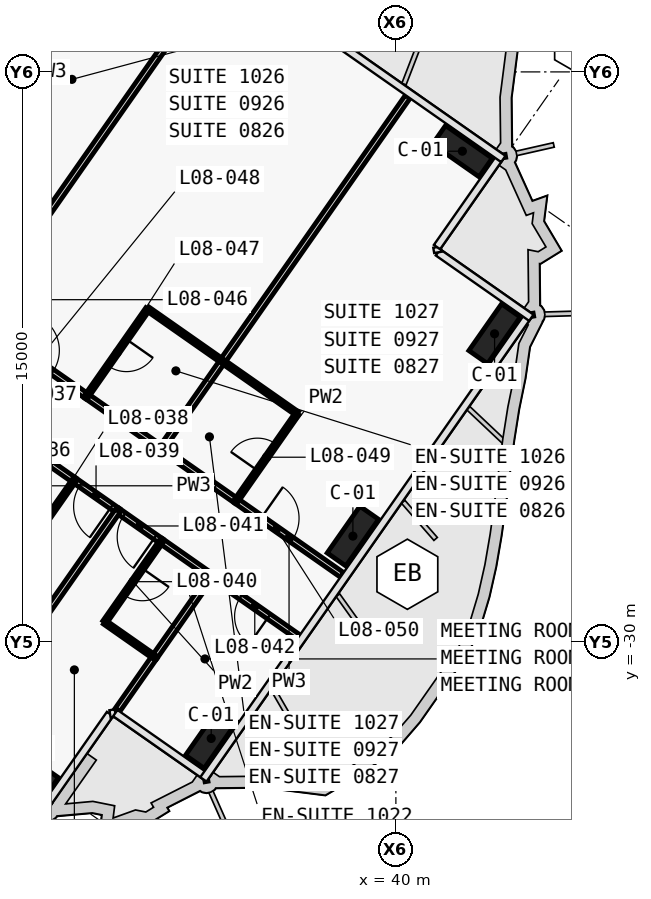
"""IFC4 building model, lengths in metres.
Left out: names, types, materials, properties, quantities, classifications, styles, units other than length and angle.
Written with IfcOpenShell. Run it as: python <this file> out.ifc"""

import sys

from ifc_helpers import new_model, si_unit, direction, frame, frame_2d, origin, origin_2d, place, context, subcontext, project, spatial, rectangle, extrude, element, fill, save


model = new_model("IFC4")
c1 = context("Model", 3, precision=1e-05, world=origin(), true_north=direction((0.0, 1.0)))
c2 = subcontext(c1, "Body", "Model", "MODEL_VIEW")
j1 = project(units=[si_unit("LENGTHUNIT", "METRE"), si_unit("PLANEANGLEUNIT", "RADIAN")], contexts=[c1])
p1 = place(None, origin())
s1 = spatial("IfcSite", under=j1, at=p1, CompositionType="ELEMENT")
p2 = place(p1, origin())
s2 = spatial("IfcBuilding", under=s1, at=p2, CompositionType="ELEMENT")
p3 = place(p2, frame((0.0, 0.0, 54.5)))
s3 = spatial("IfcBuildingStorey", under=s2, at=p3, CompositionType="ELEMENT", Elevation=54.5)
for number, where, z_axis, x_axis in (
    (1, (30.336, -33.388, 0.0), (0.0, 0.0, 1.0), (0.819, -0.574, 0.0)),
    (2, (41.75, -17.087, 0.0), (0.0, 0.0, 1.0), (0.819, -0.574, 0.0)),
    (3, (35.14, -32.541, 0.0), (0.0, 0.0, 1.0), (0.574, 0.819, 0.0)),
    (4, (38.869, -27.216, 0.0), (0.0, 0.0, 1.0), (0.574, 0.819, 0.0)),
    (5, (42.597, -21.892, 0.0), (0.0, 0.0, 1.0), (0.574, 0.819, 0.0)),
):
    element("IfcColumn", number, at=place(p3, frame(where, z_axis=z_axis, x_axis=x_axis)), inside=s3, PredefinedType="COLUMN", context=c2, shape_type="SweptSolid", body=[
        extrude(rectangle(XDim=1.5, YDim=0.6, at=origin_2d()), origin(), (0.0, 0.0, 1.0), 3.6),
    ])
p4 = place(p3, frame((28.914, -21.467, 0.0), z_axis=(0.0, 0.0, 1.0), x_axis=(0.819145961204, -0.573585123798, 0.0)))
e6 = element("IfcWall", 6, at=p4, inside=s3, PredefinedType="PARTITIONING", context=c2, shape_type="SweptSolid", body=[
    extrude(rectangle(XDim=3.603, YDim=0.15, at=frame_2d((1.802, 0.0))), origin(), (0.0, 0.0, 1.0), 2.6),
])
p5 = place(p4, frame((1.502, 0.0, 0.0)))
e7 = element("IfcOpeningElement", 7, at=p5, cuts=e6, PredefinedType="OPENING", context=c2, shape_type="SweptSolid", body=[
    extrude(rectangle(XDim=1.0, YDim=2.1, at=frame_2d((0.5, 1.05))), frame((0.0, 0.085, 0.0), z_axis=(0.0, -1.0, 0.0), x_axis=(1.0, 0.0, 0.0)), (0.0, 0.0, 1.0), 0.17),
])
p6 = place(p3, frame((31.863, -23.531, 0.0), z_axis=(0.0, 0.0, 1.0), x_axis=(0.819146032251, -0.573585022335, 0.0)))
e8 = element("IfcWall", 8, at=p6, inside=s3, PredefinedType="PARTITIONING", context=c2, shape_type="SweptSolid", body=[
    extrude(rectangle(XDim=2.404, YDim=0.15, at=frame_2d((1.202, 0.0))), origin(), (0.0, 0.0, 1.0), 3.32),
])
p7 = place(p3, frame((35.796, -26.285, 0.0), z_axis=(0.0, 0.0, 1.0), x_axis=(0.819154345195, -0.573573150303, 0.0)))
e9 = element("IfcWall", 9, at=p7, inside=s3, PredefinedType="PARTITIONING", context=c2, shape_type="SweptSolid", body=[
    extrude(rectangle(XDim=3.401, YDim=0.15, at=frame_2d((1.7, 0.0))), origin(), (0.0, 0.0, 1.0), 2.5),
])
p8 = place(p7, frame((0.801, 0.0, 0.0)))
e10 = element("IfcOpeningElement", 10, at=p8, cuts=e9, PredefinedType="OPENING", context=c2, shape_type="SweptSolid", body=[
    extrude(rectangle(XDim=1.0, YDim=2.1, at=frame_2d((0.5, 1.05))), frame((0.0, 0.085, 0.0), z_axis=(0.0, -1.0, 0.0), x_axis=(1.0, 0.0, 0.0)), (0.0, 0.0, 1.0), 0.17),
])
p9 = place(p3, frame((33.829, -24.908, 0.0), z_axis=(0.0, 0.0, 1.0), x_axis=(0.819146032251, -0.573585022335, 0.0)))
e11 = element("IfcWall", 11, at=p9, inside=s3, PredefinedType="PARTITIONING", context=c2, shape_type="SweptSolid", body=[
    extrude(rectangle(XDim=2.404, YDim=0.15, at=frame_2d((1.202, 0.0))), origin(), (0.0, 0.0, 1.0), 3.32),
])
p10 = place(p3, frame((37.435, -29.875, 0.0), z_axis=(0.0, 0.0, 1.0), x_axis=(-0.819125488359, 0.573614360281, 0.0)))
e12 = element("IfcWall", 12, at=p10, inside=s3, PredefinedType="PARTITIONING", context=c2, shape_type="SweptSolid", body=[
    extrude(rectangle(XDim=2.802, YDim=0.15, at=frame_2d((1.401, 0.0))), origin(), (0.0, 0.0, 1.0), 2.5),
])
p11 = place(p10, frame((0.951, 0.0, 0.0)))
e13 = element("IfcOpeningElement", 13, at=p11, cuts=e12, PredefinedType="OPENING", context=c2, shape_type="SweptSolid", body=[
    extrude(rectangle(XDim=0.9, YDim=2.1, at=frame_2d((0.45, 1.05))), frame((0.0, 0.085, 0.0), z_axis=(0.0, -1.0, 0.0), x_axis=(1.0, 0.0, 0.0)), (0.0, 0.0, 1.0), 0.17),
])
p12 = place(p3, frame((32.685, -26.549, 0.0), z_axis=(0.0, 0.0, 1.0), x_axis=(-0.819199220913, 0.573509055252, 0.0)))
e14 = element("IfcWall", 14, at=p12, inside=s3, PredefinedType="PARTITIONING", context=c2, shape_type="SweptSolid", body=[
    extrude(rectangle(XDim=1.403, YDim=0.15, at=frame_2d((0.702, 0.0))), origin(), (0.0, 0.0, 1.0), 3.32),
])
p13 = place(p12, frame((0.202, 0.0, 0.0)))
e15 = element("IfcOpeningElement", 15, at=p13, cuts=e14, PredefinedType="OPENING", context=c2, shape_type="SweptSolid", body=[
    extrude(rectangle(XDim=1.0, YDim=2.1, at=frame_2d((0.5, 1.05))), frame((0.0, 0.085, 0.0), z_axis=(0.0, -1.0, 0.0), x_axis=(1.0, 0.0, 0.0)), (0.0, 0.0, 1.0), 0.17),
])
p14 = place(p3, frame((31.539, -25.746, 0.0), z_axis=(0.0, 0.0, 1.0), x_axis=(-0.819117502046, 0.573625764625, 0.0)))
e16 = element("IfcWall", 16, at=p14, inside=s3, PredefinedType="PARTITIONING", context=c2, shape_type="SweptSolid", body=[
    extrude(rectangle(XDim=1.604, YDim=0.15, at=frame_2d((0.802, 0.0))), origin(), (0.0, 0.0, 1.0), 3.32),
])
p15 = place(p3, frame((33.831, -27.351, 0.0), z_axis=(0.0, 0.0, 1.0), x_axis=(-0.819117471667, 0.573625808005, 0.0)))
e17 = element("IfcWall", 17, at=p15, inside=s3, PredefinedType="PARTITIONING", context=c2, shape_type="SweptSolid", body=[
    extrude(rectangle(XDim=1.403, YDim=0.15, at=frame_2d((0.702, 0.0))), origin(), (0.0, 0.0, 1.0), 3.32),
])
p16 = place(p15, frame((0.201, 0.0, 0.0)))
e18 = element("IfcOpeningElement", 18, at=p16, cuts=e17, PredefinedType="OPENING", context=c2, shape_type="SweptSolid", body=[
    extrude(rectangle(XDim=1.0, YDim=2.1, at=frame_2d((0.5, 1.05))), frame((0.0, 0.085, 0.0), z_axis=(0.0, -1.0, 0.0), x_axis=(1.0, 0.0, 0.0)), (0.0, 0.0, 1.0), 0.17),
])
p17 = place(p3, frame((35.143, -28.27, 0.0), z_axis=(0.0, 0.0, 1.0), x_axis=(-0.819189013667, 0.573523634986, 0.0)))
e19 = element("IfcWall", 19, at=p17, inside=s3, PredefinedType="PARTITIONING", context=c2, shape_type="SweptSolid", body=[
    extrude(rectangle(XDim=1.604, YDim=0.15, at=frame_2d((0.802, 0.0))), origin(), (0.0, 0.0, 1.0), 3.32),
])
p18 = place(p3, frame((32.94, -10.491, 0.0), z_axis=(0.0, 0.0, 1.0), x_axis=(-0.573593433868, -0.819140142237, 0.0)))
e20 = element("IfcWall", 20, at=p18, inside=s3, PredefinedType="PARTITIONING", context=c2, shape_type="SweptSolid", body=[
    extrude(rectangle(XDim=8.499, YDim=0.15, at=frame_2d((4.25, 0.0))), origin(), (0.0, 0.0, 1.0), 2.6),
])
p19 = place(p3, frame((35.013, -12.76, 0.0), z_axis=(0.0, 0.0, 1.0), x_axis=(-0.573558725113, -0.819164445546, 0.0)))
e21 = element("IfcWall", 21, at=p19, inside=s3, PredefinedType="PARTITIONING", context=c2, shape_type="SweptSolid", body=[
    extrude(rectangle(XDim=9.01, YDim=0.15, at=frame_2d((4.505, 0.0))), origin(), (0.0, 0.0, 1.0), 2.6),
])
p20 = place(p3, frame((35.438, -22.615, 0.0), z_axis=(0.0, 0.0, 1.0), x_axis=(-0.819141114317, 0.573592045652, 0.0)))
e22 = element("IfcWall", 22, at=p20, inside=s3, PredefinedType="PARTITIONING", context=c2, shape_type="SweptSolid", body=[
    extrude(rectangle(XDim=2.4, YDim=0.12, at=frame_2d((1.2, 0.0))), origin(), (0.0, 0.0, 1.0), 3.32),
])
p21 = place(p3, frame((33.47, -21.239, 0.0), z_axis=(0.0, 0.0, 1.0), x_axis=(-0.573550118428, -0.819170471667, 0.0)))
e23 = element("IfcWall", 23, at=p21, inside=s3, PredefinedType="PARTITIONING", context=c2, shape_type="SweptSolid", body=[
    extrude(rectangle(XDim=2.8, YDim=0.12, at=frame_2d((1.4, 0.0))), origin(), (0.0, 0.0, 1.0), 2.6),
])
p22 = place(p21, frame((0.975, 0.0, 0.0)))
e24 = element("IfcOpeningElement", 24, at=p22, cuts=e23, PredefinedType="OPENING", context=c2, shape_type="SweptSolid", body=[
    extrude(rectangle(XDim=0.85, YDim=2.05, at=frame_2d((0.425, 1.025))), frame((0.0, 0.07, 0.0), z_axis=(0.0, -1.0, 0.0), x_axis=(1.0, 0.0, 0.0)), (0.0, 0.0, 1.0), 0.14),
])
p23 = place(p3, frame((40.312, -15.653, 0.0), z_axis=(0.0, 0.0, 1.0), x_axis=(-0.573560662175, -0.81916308926, 0.0)))
e25 = element("IfcWall", 25, at=p23, inside=s3, PredefinedType="PARTITIONING", context=c2, shape_type="SweptSolid", body=[
    extrude(rectangle(XDim=8.499, YDim=0.15, at=frame_2d((4.25, 0.0))), origin(), (0.0, 0.0, 1.0), 2.5),
])
p24 = place(p3, frame((35.437, -22.616, 0.0), z_axis=(0.0, 0.0, 1.0), x_axis=(-0.573550118428, -0.819170471667, 0.0)))
e26 = element("IfcWall", 26, at=p24, inside=s3, PredefinedType="PARTITIONING", context=c2, shape_type="SweptSolid", body=[
    extrude(rectangle(XDim=2.8, YDim=0.15, at=frame_2d((1.4, 0.0))), origin(), (0.0, 0.0, 1.0), 2.6),
])
p25 = place(p3, frame((35.798, -26.287, 0.0), z_axis=(0.0, 0.0, 1.0), x_axis=(0.573550118428, 0.819170471667, 0.0)))
e27 = element("IfcWall", 27, at=p25, inside=s3, PredefinedType="PARTITIONING", context=c2, shape_type="SweptSolid", body=[
    extrude(rectangle(XDim=2.8, YDim=0.12, at=frame_2d((1.4, 0.0))), origin(), (0.0, 0.0, 1.0), 2.6),
])
p26 = place(p25, frame((0.975, 0.0, 0.0)))
e28 = element("IfcOpeningElement", 28, at=p26, cuts=e27, PredefinedType="OPENING", context=c2, shape_type="SweptSolid", body=[
    extrude(rectangle(XDim=0.85, YDim=2.05, at=frame_2d((0.425, 1.025))), frame((0.0, 0.07, 0.0), z_axis=(0.0, -1.0, 0.0), x_axis=(1.0, 0.0, 0.0)), (0.0, 0.0, 1.0), 0.14),
])
p27 = place(p3, frame((37.403, -23.991, 0.0), z_axis=(0.0, 0.0, 1.0), x_axis=(-0.819155442668, 0.573571582932, 0.0)))
e29 = element("IfcWall", 29, at=p27, inside=s3, PredefinedType="PARTITIONING", context=c2, shape_type="SweptSolid", body=[
    extrude(rectangle(XDim=2.4, YDim=0.12, at=frame_2d((1.2, 0.0))), origin(), (0.0, 0.0, 1.0), 3.32),
])
p28 = place(p3, frame((33.65, -30.397, 0.0), z_axis=(0.0, 0.0, 1.0), x_axis=(-0.573568305454, -0.819157737544, 0.0)))
e30 = element("IfcWall", 30, at=p28, inside=s3, PredefinedType="PARTITIONING", context=c2, shape_type="SweptSolid", body=[
    extrude(rectangle(XDim=1.701, YDim=0.15, at=frame_2d((0.851, 0.0))), origin(), (0.0, 0.0, 1.0), 3.32),
])
p29 = place(p3, frame((33.649, -30.4, 0.0), z_axis=(0.0, 0.0, 1.0), x_axis=(0.573544201094, 0.819174614714, 0.0)))
e31 = element("IfcWall", 31, at=p29, inside=s3, PredefinedType="PARTITIONING", context=c2, shape_type="SweptSolid", body=[
    extrude(rectangle(XDim=2.602, YDim=0.15, at=frame_2d((1.301, 0.0))), origin(), (0.0, 0.0, 1.0), 3.32),
])
p30 = place(p3, frame((30.046, -27.875, 0.0), z_axis=(0.0, 0.0, 1.0), x_axis=(0.573537965655, 0.819178980414, 0.0)))
e32 = element("IfcWall", 32, at=p30, inside=s3, PredefinedType="PARTITIONING", context=c2, shape_type="SweptSolid", body=[
    extrude(rectangle(XDim=2.6, YDim=0.12, at=frame_2d((1.3, 0.0))), origin(), (0.0, 0.0, 1.0), 3.32),
])
p31 = place(p30, frame((0.875, 0.0, 0.0)))
e33 = element("IfcOpeningElement", 33, at=p31, cuts=e32, PredefinedType="OPENING", context=c2, shape_type="SweptSolid", body=[
    extrude(rectangle(XDim=0.85, YDim=2.05, at=frame_2d((0.425, 1.025))), frame((0.0, 0.07, 0.0), z_axis=(0.0, -1.0, 0.0), x_axis=(1.0, 0.0, 0.0)), (0.0, 0.0, 1.0), 0.14),
])
p32 = place(p3, frame((32.684, -26.548, 0.0), z_axis=(0.0, 0.0, 1.0), x_axis=(-0.573556610931, -0.81916592584, 0.0)))
e34 = element("IfcWall", 34, at=p32, inside=s3, PredefinedType="PARTITIONING", context=c2, shape_type="SweptSolid", body=[
    extrude(rectangle(XDim=7.3, YDim=0.15, at=frame_2d((3.65, 0.0))), origin(), (0.0, 0.0, 1.0), 2.5),
])
p33 = place(p3, frame((33.83, -27.35, 0.0), z_axis=(0.0, 0.0, 1.0), x_axis=(-0.573537965655, -0.819178980414, 0.0)))
e35 = element("IfcWall", 35, at=p33, inside=s3, PredefinedType="PARTITIONING", context=c2, shape_type="SweptSolid", body=[
    extrude(rectangle(XDim=2.6, YDim=0.12, at=frame_2d((1.3, 0.0))), origin(), (0.0, 0.0, 1.0), 3.32),
])
p34 = place(p33, frame((0.875, 0.0, 0.0)))
e36 = element("IfcOpeningElement", 36, at=p34, cuts=e35, PredefinedType="OPENING", context=c2, shape_type="SweptSolid", body=[
    extrude(rectangle(XDim=0.85, YDim=2.05, at=frame_2d((0.425, 1.025))), frame((0.0, 0.07, 0.0), z_axis=(0.0, -1.0, 0.0), x_axis=(1.0, 0.0, 0.0)), (0.0, 0.0, 1.0), 0.14),
])
p35 = place(p3, frame((32.339, -29.481, 0.0), z_axis=(0.0, 0.0, 1.0), x_axis=(0.819131543282, -0.57360571371, 0.0)))
e37 = element("IfcWall", 37, at=p35, inside=s3, PredefinedType="PARTITIONING", context=c2, shape_type="SweptSolid", body=[
    extrude(rectangle(XDim=1.6, YDim=0.12, at=frame_2d((0.8, 0.0))), origin(), (0.0, 0.0, 1.0), 3.32),
])
p36 = place(p31, origin())
e38 = element("IfcDoor", 38, at=p36, inside=s3, OperationType="SINGLE_SWING_LEFT", PredefinedType="DOOR", context=c2, shape_type="SweptSolid", body=[
    extrude(rectangle(XDim=0.85, YDim=2.05, at=frame_2d((0.425, 1.025))), frame((0.0, 0.025, 0.0), z_axis=(0.0, -1.0, 0.0), x_axis=(1.0, 0.0, 0.0)), (0.0, 0.0, 1.0), 0.05),
])
fill(e33, e38)
p37 = place(p13, origin())
e39 = element("IfcDoor", 39, at=p37, inside=s3, OperationType="SINGLE_SWING_RIGHT", PredefinedType="DOOR", context=c2, shape_type="SweptSolid", body=[
    extrude(rectangle(XDim=1.0, YDim=2.1, at=frame_2d((0.5, 1.05))), frame((0.0, 0.025, 0.0), z_axis=(0.0, -1.0, 0.0), x_axis=(1.0, 0.0, 0.0)), (0.0, 0.0, 1.0), 0.05),
])
fill(e15, e39)
p38 = place(p34, origin())
e40 = element("IfcDoor", 40, at=p38, inside=s3, OperationType="SINGLE_SWING_LEFT", PredefinedType="DOOR", context=c2, shape_type="SweptSolid", body=[
    extrude(rectangle(XDim=0.85, YDim=2.05, at=frame_2d((0.425, 1.025))), frame((0.0, 0.025, 0.0), z_axis=(0.0, -1.0, 0.0), x_axis=(1.0, 0.0, 0.0)), (0.0, 0.0, 1.0), 0.05),
])
fill(e36, e40)
p39 = place(p16, origin())
e41 = element("IfcDoor", 41, at=p39, inside=s3, OperationType="SINGLE_SWING_RIGHT", PredefinedType="DOOR", context=c2, shape_type="SweptSolid", body=[
    extrude(rectangle(XDim=1.0, YDim=2.1, at=frame_2d((0.5, 1.05))), frame((0.0, 0.025, 0.0), z_axis=(0.0, -1.0, 0.0), x_axis=(1.0, 0.0, 0.0)), (0.0, 0.0, 1.0), 0.05),
])
fill(e18, e41)
p40 = place(p11, origin())
e42 = element("IfcDoor", 42, at=p40, inside=s3, OperationType="SINGLE_SWING_RIGHT", PredefinedType="DOOR", context=c2, shape_type="SweptSolid", body=[
    extrude(rectangle(XDim=0.9, YDim=2.1, at=frame_2d((0.45, 1.05))), frame((0.0, 0.025, 0.0), z_axis=(0.0, -1.0, 0.0), x_axis=(1.0, 0.0, 0.0)), (0.0, 0.0, 1.0), 0.05),
])
fill(e13, e42)
p41 = place(p22, origin())
e43 = element("IfcDoor", 43, at=p41, inside=s3, OperationType="SINGLE_SWING_LEFT", PredefinedType="DOOR", context=c2, shape_type="SweptSolid", body=[
    extrude(rectangle(XDim=0.85, YDim=2.05, at=frame_2d((0.425, 1.025))), frame((0.0, 0.025, 0.0), z_axis=(0.0, -1.0, 0.0), x_axis=(1.0, 0.0, 0.0)), (0.0, 0.0, 1.0), 0.05),
])
fill(e24, e43)
p42 = place(p5, origin())
e44 = element("IfcDoor", 44, at=p42, inside=s3, OperationType="SINGLE_SWING_RIGHT", PredefinedType="DOOR", context=c2, shape_type="SweptSolid", body=[
    extrude(rectangle(XDim=1.0, YDim=2.1, at=frame_2d((0.5, 1.05))), frame((0.0, 0.025, 0.0), z_axis=(0.0, -1.0, 0.0), x_axis=(1.0, 0.0, 0.0)), (0.0, 0.0, 1.0), 0.05),
])
fill(e7, e44)
p43 = place(p26, origin())
e45 = element("IfcDoor", 45, at=p43, inside=s3, OperationType="SINGLE_SWING_LEFT", PredefinedType="DOOR", context=c2, shape_type="SweptSolid", body=[
    extrude(rectangle(XDim=0.85, YDim=2.05, at=frame_2d((0.425, 1.025))), frame((0.0, 0.025, 0.0), z_axis=(0.0, -1.0, 0.0), x_axis=(1.0, 0.0, 0.0)), (0.0, 0.0, 1.0), 0.05),
])
fill(e28, e45)
p44 = place(p8, origin())
e46 = element("IfcDoor", 46, at=p44, inside=s3, OperationType="SINGLE_SWING_LEFT", PredefinedType="DOOR", context=c2, shape_type="SweptSolid", body=[
    extrude(rectangle(XDim=1.0, YDim=2.1, at=frame_2d((0.5, 1.05))), frame((0.0, 0.025, 0.0), z_axis=(0.0, -1.0, 0.0), x_axis=(1.0, 0.0, 0.0)), (0.0, 0.0, 1.0), 0.05),
])
fill(e10, e46)
save(model, sys.argv[1])
